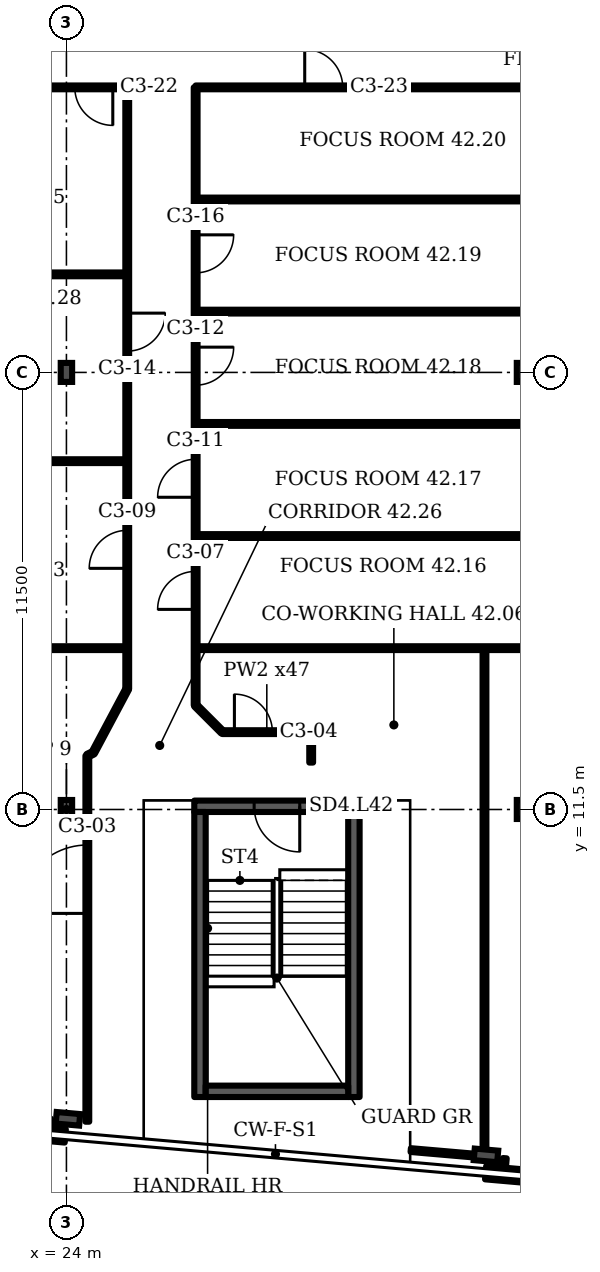
"""IFC4 building model, lengths in metres.
Left out: names, types, materials, properties, quantities, classifications, styles, units other than length and angle.
Written with IfcOpenShell. Run it as: python <this file> out.ifc"""

import sys

from ifc_helpers import new_model, si_unit, direction, frame, frame_2d, origin, origin_2d, place, context, subcontext, project, spatial, rectangle, i_section, extrude, element, fill, save


model = new_model("IFC4")
c1 = context("Model", 3, precision=1e-05, world=origin(), true_north=direction((0.0, 1.0)))
c2 = subcontext(c1, "Body", "Model", "MODEL_VIEW")
j1 = project(units=[si_unit("LENGTHUNIT", "METRE"), si_unit("PLANEANGLEUNIT", "RADIAN")], contexts=[c1])
p1 = place(None, origin())
s1 = spatial("IfcSite", under=j1, at=p1, CompositionType="ELEMENT")
p2 = place(p1, origin())
s2 = spatial("IfcBuilding", under=s1, at=p2, CompositionType="ELEMENT")
p3 = place(p2, frame((0.0, 0.0, 173.5)))
s3 = spatial("IfcBuildingStorey", under=s2, at=p3, CompositionType="ELEMENT", Elevation=173.5)
for number, where, z_axis, x_axis in (
    (1, (24.039, 3.361, 0.0), (0.0, 0.0, 1.0), (-0.087, -0.996, 0.0)),
    (2, (35.039, 2.399, 0.0), (0.0, 0.0, 1.0), (-0.087, -0.996, 0.0)),
):
    element("IfcColumn", number, at=place(p3, frame(where, z_axis=z_axis, x_axis=x_axis)), inside=s3, PredefinedType="COLUMN", context=c2, shape_type="SweptSolid", body=[
        extrude(i_section(OverallWidth=0.305, OverallDepth=0.62, WebThickness=0.021, FlangeThickness=0.04, FilletRadius=0.027, at=origin_2d()), origin(), (0.0, 0.0, 1.0), 3.6),
    ])
for number, where, z_axis, x_axis in (
    (3, (24.0, 11.5, 0.0), (0.0, 0.0, 1.0), (1.0, 0.0, 0.0)),
    (4, (36.0, 11.5, 0.0), (0.0, 0.0, 1.0), (1.0, 0.0, 0.0)),
    (5, (24.0, 23.0, 0.0), (0.0, 0.0, 1.0), (1.0, 0.0, 0.0)),
    (6, (36.0, 23.0, 0.0), (0.0, 0.0, 1.0), (1.0, 0.0, 0.0)),
):
    element("IfcColumn", number, at=place(p3, frame(where, z_axis=z_axis, x_axis=x_axis)), inside=s3, PredefinedType="COLUMN", context=c2, shape_type="SweptSolid", body=[
        extrude(i_section(OverallWidth=0.3, OverallDepth=0.5, WebThickness=0.014, FlangeThickness=0.028, FilletRadius=0.027, at=origin_2d()), origin(), (0.0, 0.0, 1.0), 3.6),
    ])
p4 = place(p3, frame((12.835, 3.885, 0.0), z_axis=(0.0, 0.0, 1.0), x_axis=(0.996199, -0.087154, 0.0)))
e7 = element("IfcWall", 7, at=p4, inside=s3, PredefinedType="SOLIDWALL", context=c2, shape_type="SweptSolid", body=[
    extrude(rectangle(XDim=11.177, YDim=0.35, at=frame_2d((5.588, 0.0))), origin(), (0.0, 0.0, 1.0), 1.0),
])
p5 = place(p3, frame((35.03, 1.943, 0.0), z_axis=(0.0, 0.0, 1.0), x_axis=(0.996199, -0.08714, 0.0)))
e8 = element("IfcWall", 8, at=p5, inside=s3, PredefinedType="SOLIDWALL", context=c2, shape_type="SweptSolid", body=[
    extrude(rectangle(XDim=11.028, YDim=0.35, at=frame_2d((5.514, 0.0))), origin(), (0.0, 0.0, 1.0), 1.0),
])
p6 = place(p3, frame((27.364, 11.584, 0.0), z_axis=(0.0, 0.0, 1.0), x_axis=(1.0, 0.0, 0.0)))
e9 = element("IfcWall", 9, at=p6, inside=s3, PredefinedType="SHEAR", context=c2, shape_type="SweptSolid", body=[
    extrude(rectangle(XDim=4.35, YDim=0.3, at=frame_2d((2.175, 0.0))), origin(), (0.0, 0.0, 1.0), 3.2),
])
p7 = place(p6, frame((1.575, 0.0, 0.0)))
e10 = element("IfcOpeningElement", 10, at=p7, cuts=e9, PredefinedType="OPENING", context=c2, shape_type="SweptSolid", body=[
    extrude(rectangle(XDim=1.2, YDim=2.1, at=frame_2d((0.6, 1.05))), frame((0.0, 0.16, 0.0), z_axis=(0.0, -1.0, 0.0), x_axis=(1.0, 0.0, 0.0)), (0.0, 0.0, 1.0), 0.32),
])
p8 = place(p3, frame((13.0, 15.745, 0.0), z_axis=(0.0, 0.0, 1.0), x_axis=(1.0, 0.0, 0.0)))
e11 = element("IfcWall", 11, at=p8, inside=s3, PredefinedType="PARTITIONING", context=c2, shape_type="SweptSolid", body=[
    extrude(rectangle(XDim=12.6, YDim=0.1, at=frame_2d((6.3, 0.0))), origin(), (0.0, 0.0, 1.0), 3.2),
])
p9 = place(p3, frame((17.8, 30.5, 0.0), z_axis=(0.0, 0.0, 1.0), x_axis=(1.0, 0.0, 0.0)))
e12 = element("IfcWall", 12, at=p9, inside=s3, PredefinedType="PARTITIONING", context=c2, shape_type="SweptSolid", body=[
    extrude(rectangle(XDim=7.8, YDim=0.1, at=frame_2d((3.9, 0.0))), origin(), (0.0, 0.0, 1.0), 3.2),
])
p10 = place(p9, frame((6.42, 0.0, 0.0)))
e13 = element("IfcOpeningElement", 13, at=p10, cuts=e12, PredefinedType="OPENING", context=c2, shape_type="SweptSolid", body=[
    extrude(rectangle(XDim=1.0, YDim=2.1, at=frame_2d((0.5, 1.05))), frame((0.0, 0.06, 0.0), z_axis=(0.0, -1.0, 0.0), x_axis=(1.0, 0.0, 0.0)), (0.0, 0.0, 1.0), 0.12),
])
for number, where, z_axis, x_axis in (
    (14, (19.0, 20.665, 0.0), (0.0, 0.0, 1.0), (1.0, 0.0, 0.0)),
    (15, (19.0, 25.58, 0.0), (0.0, 0.0, 1.0), (1.0, 0.0, 0.0)),
):
    element("IfcWall", number, at=place(p3, frame(where, z_axis=z_axis, x_axis=x_axis)), inside=s3, PredefinedType="PARTITIONING", context=c2, shape_type="SweptSolid", body=[
        extrude(rectangle(XDim=6.6, YDim=0.1, at=frame_2d((3.3, 0.0))), origin(), (0.0, 0.0, 1.0), 3.2),
    ])
p11 = place(p3, frame((24.55, 12.915, 0.0), z_axis=(0.0, 0.0, 1.0), x_axis=(0.900306, 0.435266, 0.0)))
e16 = element("IfcWall", 16, at=p11, inside=s3, PredefinedType="PARTITIONING", context=c2, shape_type="SweptSolid", body=[
    extrude(rectangle(XDim=0.172, YDim=0.1, at=frame_2d((0.086, 0.0))), origin(), (0.0, 0.0, 1.0), 3.2),
])
p12 = place(p3, frame((24.55, 3.285, 0.0), z_axis=(0.0, 0.0, 1.0), x_axis=(0.0, 1.0, 0.0)))
e17 = element("IfcWall", 17, at=p12, inside=s3, PredefinedType="PARTITIONING", context=c2, shape_type="SweptSolid", body=[
    extrude(rectangle(XDim=9.63, YDim=0.1, at=frame_2d((4.815, 0.0))), origin(), (0.0, 0.0, 1.0), 3.2),
])
p13 = place(p12, frame((5.481, 0.0, 0.0)))
e18 = element("IfcOpeningElement", 18, at=p13, cuts=e17, PredefinedType="OPENING", context=c2, shape_type="SweptSolid", body=[
    extrude(rectangle(XDim=1.8, YDim=2.1, at=frame_2d((0.9, 1.05))), frame((0.0, 0.06, 0.0), z_axis=(0.0, -1.0, 0.0), x_axis=(1.0, 0.0, 0.0)), (0.0, 0.0, 1.0), 0.12),
])
p14 = place(p3, frame((24.705, 12.99, 0.0), z_axis=(0.0, 0.0, 1.0), x_axis=(0.4702, 0.882555, 0.0)))
e19 = element("IfcWall", 19, at=p14, inside=s3, PredefinedType="PARTITIONING", context=c2, shape_type="SweptSolid", body=[
    extrude(rectangle(XDim=1.904, YDim=0.1, at=frame_2d((0.952, 0.0))), origin(), (0.0, 0.0, 1.0), 3.2),
])
p15 = place(p3, frame((25.6, 14.67, 0.0), z_axis=(0.0, 0.0, 1.0), x_axis=(0.0, 1.0, 0.0)))
e20 = element("IfcWall", 20, at=p15, inside=s3, PredefinedType="PARTITIONING", context=c2, shape_type="SweptSolid", body=[
    extrude(rectangle(XDim=15.83, YDim=0.1, at=frame_2d((7.915, 0.0))), origin(), (0.0, 0.0, 1.0), 3.2),
])
p16 = place(p15, frame((3.175, 0.0, 0.0)))
e21 = element("IfcOpeningElement", 21, at=p16, cuts=e20, PredefinedType="OPENING", context=c2, shape_type="SweptSolid", body=[
    extrude(rectangle(XDim=1.0, YDim=2.1, at=frame_2d((0.5, 1.05))), frame((0.0, 0.06, 0.0), z_axis=(0.0, -1.0, 0.0), x_axis=(1.0, 0.0, 0.0)), (0.0, 0.0, 1.0), 0.12),
])
p17 = place(p15, frame((8.89, 0.0, 0.0)))
e22 = element("IfcOpeningElement", 22, at=p17, cuts=e20, PredefinedType="OPENING", context=c2, shape_type="SweptSolid", body=[
    extrude(rectangle(XDim=1.0, YDim=2.1, at=frame_2d((0.5, 1.05))), frame((0.0, 0.06, 0.0), z_axis=(0.0, -1.0, 0.0), x_axis=(1.0, 0.0, 0.0)), (0.0, 0.0, 1.0), 0.12),
])
p18 = place(p3, frame((27.4, 14.24, 0.0), z_axis=(0.0, 0.0, 1.0), x_axis=(0.0, 1.0, 0.0)))
e23 = element("IfcWall", 23, at=p18, inside=s3, PredefinedType="PARTITIONING", context=c2, shape_type="SweptSolid", body=[
    extrude(rectangle(XDim=16.26, YDim=0.1, at=frame_2d((8.13, 0.0))), origin(), (0.0, 0.0, 1.0), 3.2),
])
p19 = place(p18, frame((2.525, 0.0, 0.0)))
e24 = element("IfcOpeningElement", 24, at=p19, cuts=e23, PredefinedType="OPENING", context=c2, shape_type="SweptSolid", body=[
    extrude(rectangle(XDim=1.0, YDim=2.1, at=frame_2d((0.5, 1.05))), frame((0.0, 0.06, 0.0), z_axis=(0.0, -1.0, 0.0), x_axis=(1.0, 0.0, 0.0)), (0.0, 0.0, 1.0), 0.12),
])
p20 = place(p18, frame((5.475, 0.0, 0.0)))
e25 = element("IfcOpeningElement", 25, at=p20, cuts=e23, PredefinedType="OPENING", context=c2, shape_type="SweptSolid", body=[
    extrude(rectangle(XDim=1.0, YDim=2.1, at=frame_2d((0.5, 1.05))), frame((0.0, 0.06, 0.0), z_axis=(0.0, -1.0, 0.0), x_axis=(1.0, 0.0, 0.0)), (0.0, 0.0, 1.0), 0.12),
])
p21 = place(p18, frame((8.425, 0.0, 0.0)))
e26 = element("IfcOpeningElement", 26, at=p21, cuts=e23, PredefinedType="OPENING", context=c2, shape_type="SweptSolid", body=[
    extrude(rectangle(XDim=1.0, YDim=2.1, at=frame_2d((0.5, 1.05))), frame((0.0, 0.06, 0.0), z_axis=(0.0, -1.0, 0.0), x_axis=(1.0, 0.0, 0.0)), (0.0, 0.0, 1.0), 0.12),
])
p22 = place(p18, frame((11.38, 0.0, 0.0)))
e27 = element("IfcOpeningElement", 27, at=p22, cuts=e23, PredefinedType="OPENING", context=c2, shape_type="SweptSolid", body=[
    extrude(rectangle(XDim=1.0, YDim=2.1, at=frame_2d((0.5, 1.05))), frame((0.0, 0.06, 0.0), z_axis=(0.0, -1.0, 0.0), x_axis=(1.0, 0.0, 0.0)), (0.0, 0.0, 1.0), 0.12),
])
p23 = place(p3, frame((27.4, 15.745, 0.0), z_axis=(0.0, 0.0, 1.0), x_axis=(1.0, 0.0, 0.0)))
e28 = element("IfcWall", 28, at=p23, inside=s3, PredefinedType="PARTITIONING", context=c2, shape_type="SweptSolid", body=[
    extrude(rectangle(XDim=17.7, YDim=0.1, at=frame_2d((8.85, 0.0))), origin(), (0.0, 0.0, 1.0), 3.2),
])
for number, where, z_axis, x_axis in (
    (29, (27.4, 18.695, 0.0), (0.0, 0.0, 1.0), (1.0, 0.0, 0.0)),
    (30, (27.4, 21.645, 0.0), (0.0, 0.0, 1.0), (1.0, 0.0, 0.0)),
    (31, (27.4, 24.6, 0.0), (0.0, 0.0, 1.0), (1.0, 0.0, 0.0)),
    (32, (27.4, 27.55, 0.0), (0.0, 0.0, 1.0), (1.0, 0.0, 0.0)),
):
    element("IfcWall", number, at=place(p3, frame(where, z_axis=z_axis, x_axis=x_axis)), inside=s3, PredefinedType="PARTITIONING", context=c2, shape_type="SweptSolid", body=[
        extrude(rectangle(XDim=9.6, YDim=0.1, at=frame_2d((4.8, 0.0))), origin(), (0.0, 0.0, 1.0), 3.2),
    ])
p24 = place(p3, frame((27.4, 30.5, 0.0), z_axis=(0.0, 0.0, 1.0), x_axis=(1.0, 0.0, 0.0)))
e33 = element("IfcWall", 33, at=p24, inside=s3, PredefinedType="PARTITIONING", context=c2, shape_type="SweptSolid", body=[
    extrude(rectangle(XDim=9.45, YDim=0.1, at=frame_2d((4.725, 0.0))), origin(), (0.0, 0.0, 1.0), 3.2),
])
p25 = place(p24, frame((2.87, 0.0, 0.0)))
e34 = element("IfcOpeningElement", 34, at=p25, cuts=e33, PredefinedType="OPENING", context=c2, shape_type="SweptSolid", body=[
    extrude(rectangle(XDim=1.0, YDim=2.1, at=frame_2d((0.5, 1.05))), frame((0.0, 0.06, 0.0), z_axis=(0.0, -1.0, 0.0), x_axis=(1.0, 0.0, 0.0)), (0.0, 0.0, 1.0), 0.12),
])
p26 = place(p3, frame((28.105, 13.535, 0.0), z_axis=(0.0, 0.0, 1.0), x_axis=(-0.707107, 0.707107, 0.0)))
e35 = element("IfcWall", 35, at=p26, inside=s3, PredefinedType="PARTITIONING", context=c2, shape_type="SweptSolid", body=[
    extrude(rectangle(XDim=0.997, YDim=0.1, at=frame_2d((0.499, 0.0))), origin(), (0.0, 0.0, 1.0), 3.2),
])
p27 = place(p3, frame((28.105, 13.535, 0.0), z_axis=(0.0, 0.0, 1.0), x_axis=(1.0, 0.0, 0.0)))
e36 = element("IfcWall", 36, at=p27, inside=s3, PredefinedType="PARTITIONING", context=c2, shape_type="SweptSolid", body=[
    extrude(rectangle(XDim=2.335, YDim=0.1, at=frame_2d((1.167, 0.0))), origin(), (0.0, 0.0, 1.0), 3.2),
])
p28 = place(p27, frame((0.315, 0.0, 0.0)))
e37 = element("IfcOpeningElement", 37, at=p28, cuts=e36, PredefinedType="OPENING", context=c2, shape_type="SweptSolid", body=[
    extrude(rectangle(XDim=1.0, YDim=2.1, at=frame_2d((0.5, 1.05))), frame((0.0, 0.06, 0.0), z_axis=(0.0, -1.0, 0.0), x_axis=(1.0, 0.0, 0.0)), (0.0, 0.0, 1.0), 0.12),
])
p29 = place(p3, frame((30.44, 12.734, 0.0), z_axis=(0.0, 0.0, 1.0), x_axis=(0.0, 1.0, 0.0)))
e38 = element("IfcWall", 38, at=p29, inside=s3, PredefinedType="PARTITIONING", context=c2, shape_type="SweptSolid", body=[
    extrude(rectangle(XDim=0.801, YDim=0.1, at=frame_2d((0.4, 0.0))), origin(), (0.0, 0.0, 1.0), 3.2),
])
p30 = place(p3, frame((35.0, 2.37, 0.0), z_axis=(0.0, 0.0, 1.0), x_axis=(-0.996265, 0.086343, 0.0)))
e39 = element("IfcWall", 39, at=p30, inside=s3, PredefinedType="PARTITIONING", context=c2, shape_type="SweptSolid", body=[
    extrude(rectangle(XDim=1.948, YDim=0.1, at=frame_2d((0.974, 0.0))), origin(), (0.0, 0.0, 1.0), 2.58),
])
p31 = place(p3, frame((35.0, 2.37, 0.0), z_axis=(0.0, 0.0, 1.0), x_axis=(0.0, 1.0, 0.0)))
e40 = element("IfcWall", 40, at=p31, inside=s3, PredefinedType="PARTITIONING", context=c2, shape_type="SweptSolid", body=[
    extrude(rectangle(XDim=13.375, YDim=0.1, at=frame_2d((6.688, 0.0))), origin(), (0.0, 0.0, 1.0), 3.2),
])
p32 = place(p3, frame((35.502, 1.927, 0.0), z_axis=(0.0, 0.0, 1.0), x_axis=(0.083045, 0.996542, 0.0)))
e41 = element("IfcWall", 41, at=p32, inside=s3, PredefinedType="PARTITIONING", context=c2, shape_type="SweptSolid", body=[
    extrude(rectangle(XDim=0.4, YDim=0.1, at=frame_2d((0.2, 0.0))), origin(), (0.0, 0.0, 1.0), 3.2),
])
for number, where, z_axis, x_axis in (
    (42, (27.514, 3.934, 0.0), (0.0, 0.0, 1.0), (0.0, 1.0, 0.0)),
    (43, (31.564, 3.934, 0.0), (0.0, 0.0, 1.0), (0.0, 1.0, 0.0)),
):
    element("IfcWall", number, at=place(p3, frame(where, z_axis=z_axis, x_axis=x_axis)), inside=s3, PredefinedType="SHEAR", context=c2, shape_type="SweptSolid", body=[
        extrude(rectangle(XDim=7.5, YDim=0.3, at=frame_2d((3.75, 0.0))), origin(), (0.0, 0.0, 1.0), 3.2),
    ])
p33 = place(p3, frame((27.664, 4.084, 0.0), z_axis=(0.0, 0.0, 1.0), x_axis=(1.0, 0.0, 0.0)))
e44 = element("IfcWall", 44, at=p33, inside=s3, PredefinedType="SHEAR", context=c2, shape_type="SweptSolid", body=[
    extrude(rectangle(XDim=3.75, YDim=0.3, at=frame_2d((1.875, 0.0))), origin(), (0.0, 0.0, 1.0), 3.2),
])
p34 = place(p7, origin())
e45 = element("IfcDoor", 45, at=p34, inside=s3, OperationType="SINGLE_SWING_RIGHT", PredefinedType="DOOR", context=c2, shape_type="SweptSolid", body=[
    extrude(rectangle(XDim=1.2, YDim=2.1, at=frame_2d((0.6, 1.05))), frame((0.0, 0.025, 0.0), z_axis=(0.0, -1.0, 0.0), x_axis=(1.0, 0.0, 0.0)), (0.0, 0.0, 1.0), 0.05),
])
fill(e10, e45)
p35 = place(p13, origin())
e46 = element("IfcDoor", 46, at=p35, inside=s3, OperationType="DOUBLE_DOOR_SINGLE_SWING", PredefinedType="DOOR", context=c2, shape_type="SweptSolid", body=[
    extrude(rectangle(XDim=1.8, YDim=2.1, at=frame_2d((0.9, 1.05))), frame((0.0, 0.025, 0.0), z_axis=(0.0, -1.0, 0.0), x_axis=(1.0, 0.0, 0.0)), (0.0, 0.0, 1.0), 0.05),
])
fill(e18, e46)
p36 = place(p28, origin())
e47 = element("IfcDoor", 47, at=p36, inside=s3, OperationType="SINGLE_SWING_LEFT", PredefinedType="DOOR", context=c2, shape_type="SweptSolid", body=[
    extrude(rectangle(XDim=1.0, YDim=2.1, at=frame_2d((0.5, 1.05))), frame((0.0, 0.025, 0.0), z_axis=(0.0, -1.0, 0.0), x_axis=(1.0, 0.0, 0.0)), (0.0, 0.0, 1.0), 0.05),
])
fill(e37, e47)
p37 = place(p19, origin())
e48 = element("IfcDoor", 48, at=p37, inside=s3, OperationType="SINGLE_SWING_LEFT", PredefinedType="DOOR", context=c2, shape_type="SweptSolid", body=[
    extrude(rectangle(XDim=1.0, YDim=2.1, at=frame_2d((0.5, 1.05))), frame((0.0, 0.025, 0.0), z_axis=(0.0, -1.0, 0.0), x_axis=(1.0, 0.0, 0.0)), (0.0, 0.0, 1.0), 0.05),
])
fill(e24, e48)
p38 = place(p16, origin())
e49 = element("IfcDoor", 49, at=p38, inside=s3, OperationType="SINGLE_SWING_LEFT", PredefinedType="DOOR", context=c2, shape_type="SweptSolid", body=[
    extrude(rectangle(XDim=1.0, YDim=2.1, at=frame_2d((0.5, 1.05))), frame((0.0, 0.025, 0.0), z_axis=(0.0, -1.0, 0.0), x_axis=(1.0, 0.0, 0.0)), (0.0, 0.0, 1.0), 0.05),
])
fill(e21, e49)
p39 = place(p20, origin())
e50 = element("IfcDoor", 50, at=p39, inside=s3, OperationType="SINGLE_SWING_LEFT", PredefinedType="DOOR", context=c2, shape_type="SweptSolid", body=[
    extrude(rectangle(XDim=1.0, YDim=2.1, at=frame_2d((0.5, 1.05))), frame((0.0, 0.025, 0.0), z_axis=(0.0, -1.0, 0.0), x_axis=(1.0, 0.0, 0.0)), (0.0, 0.0, 1.0), 0.05),
])
fill(e25, e50)
p40 = place(p21, origin())
e51 = element("IfcDoor", 51, at=p40, inside=s3, OperationType="SINGLE_SWING_RIGHT", PredefinedType="DOOR", context=c2, shape_type="SweptSolid", body=[
    extrude(rectangle(XDim=1.0, YDim=2.1, at=frame_2d((0.5, 1.05))), frame((0.0, 0.025, 0.0), z_axis=(0.0, -1.0, 0.0), x_axis=(1.0, 0.0, 0.0)), (0.0, 0.0, 1.0), 0.05),
])
fill(e26, e51)
p41 = place(p17, origin())
e52 = element("IfcDoor", 52, at=p41, inside=s3, OperationType="SINGLE_SWING_RIGHT", PredefinedType="DOOR", context=c2, shape_type="SweptSolid", body=[
    extrude(rectangle(XDim=1.0, YDim=2.1, at=frame_2d((0.5, 1.05))), frame((0.0, 0.025, 0.0), z_axis=(0.0, -1.0, 0.0), x_axis=(1.0, 0.0, 0.0)), (0.0, 0.0, 1.0), 0.05),
])
fill(e22, e52)
p42 = place(p22, origin())
e53 = element("IfcDoor", 53, at=p42, inside=s3, OperationType="SINGLE_SWING_RIGHT", PredefinedType="DOOR", context=c2, shape_type="SweptSolid", body=[
    extrude(rectangle(XDim=1.0, YDim=2.1, at=frame_2d((0.5, 1.05))), frame((0.0, 0.025, 0.0), z_axis=(0.0, -1.0, 0.0), x_axis=(1.0, 0.0, 0.0)), (0.0, 0.0, 1.0), 0.05),
])
fill(e27, e53)
p43 = place(p10, origin())
e54 = element("IfcDoor", 54, at=p43, inside=s3, OperationType="SINGLE_SWING_RIGHT", PredefinedType="DOOR", context=c2, shape_type="SweptSolid", body=[
    extrude(rectangle(XDim=1.0, YDim=2.1, at=frame_2d((0.5, 1.05))), frame((0.0, 0.025, 0.0), z_axis=(0.0, -1.0, 0.0), x_axis=(1.0, 0.0, 0.0)), (0.0, 0.0, 1.0), 0.05),
])
fill(e13, e54)
p44 = place(p25, origin())
e55 = element("IfcDoor", 55, at=p44, inside=s3, OperationType="SINGLE_SWING_LEFT", PredefinedType="DOOR", context=c2, shape_type="SweptSolid", body=[
    extrude(rectangle(XDim=1.0, YDim=2.1, at=frame_2d((0.5, 1.05))), frame((0.0, 0.025, 0.0), z_axis=(0.0, -1.0, 0.0), x_axis=(1.0, 0.0, 0.0)), (0.0, 0.0, 1.0), 0.05),
])
fill(e34, e55)
save(model, sys.argv[1])
